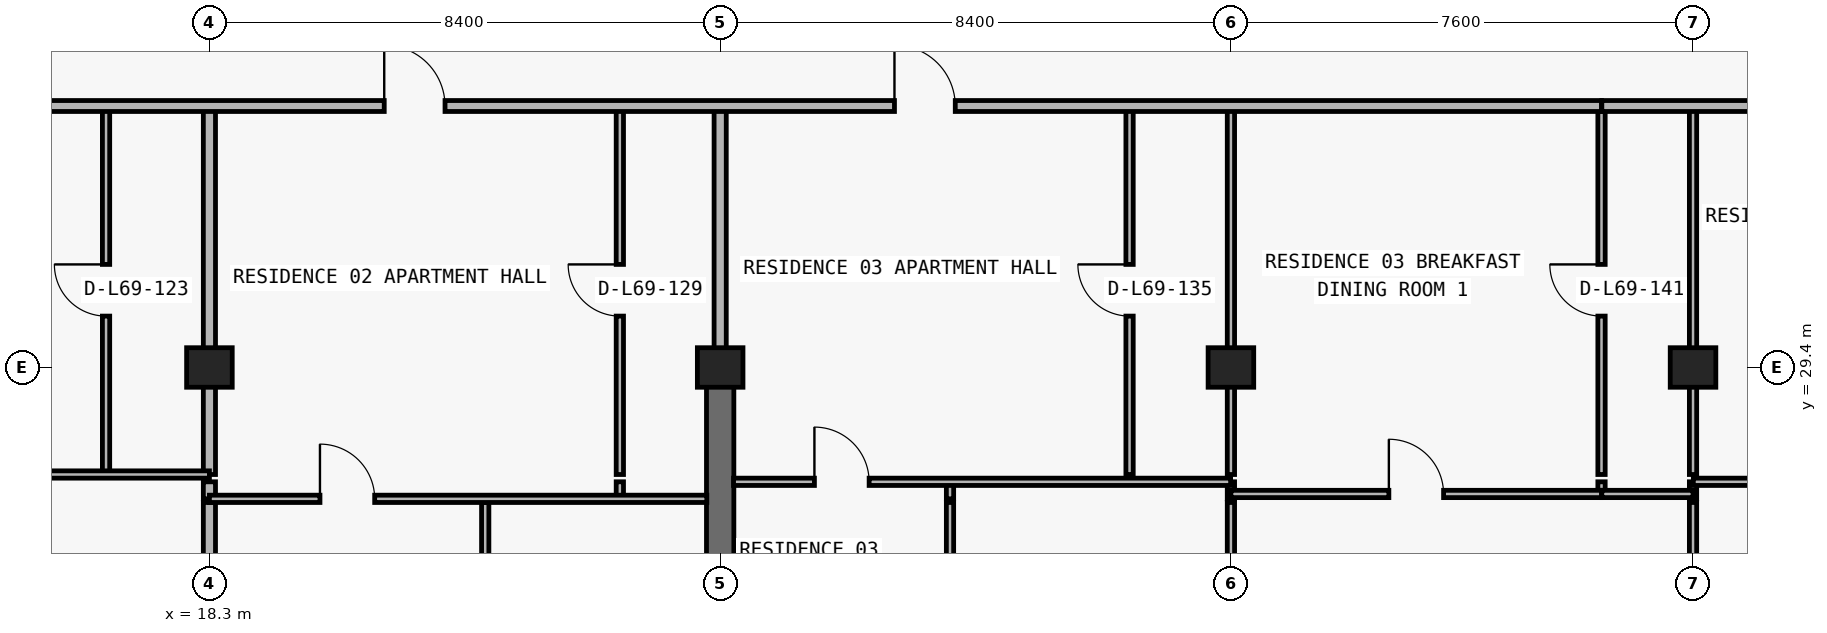
"""IFC4 building model, lengths in metres.
Left out: names, types, materials, properties, quantities, classifications, styles, units other than length and angle.
Written with IfcOpenShell. Run it as: python <this file> out.ifc"""

import sys

from ifc_helpers import new_model, si_unit, direction, frame, frame_2d, origin, origin_2d, place, context, subcontext, project, spatial, rectangle, extrude, element, fill, save


model = new_model("IFC4")
c1 = context("Model", 3, precision=1e-05, world=origin(), true_north=direction((0.0, 1.0)))
c2 = subcontext(c1, "Body", "Model", "MODEL_VIEW")
j1 = project(units=[si_unit("LENGTHUNIT", "METRE"), si_unit("PLANEANGLEUNIT", "RADIAN")], contexts=[c1])
p1 = place(None, origin())
s1 = spatial("IfcSite", under=j1, at=p1, CompositionType="ELEMENT")
p2 = place(p1, origin())
s2 = spatial("IfcBuilding", under=s1, at=p2, CompositionType="ELEMENT")
p3 = place(p2, frame((0.0, 0.0, 246.3)))
s3 = spatial("IfcBuildingStorey", under=s2, at=p3, CompositionType="ELEMENT", Elevation=246.3)
for number, where, z_axis, x_axis in (
    (1, (18.3, 29.4, 0.0), (0.0, 0.0, 1.0), (1.0, 0.0, 0.0)),
    (2, (26.7, 29.4, 0.0), (0.0, 0.0, 1.0), (1.0, 0.0, 0.0)),
    (3, (35.1, 29.4, 0.0), (0.0, 0.0, 1.0), (1.0, 0.0, 0.0)),
    (4, (42.7, 29.4, 0.0), (0.0, 0.0, 1.0), (1.0, 0.0, 0.0)),
):
    element("IfcColumn", number, at=place(p3, frame(where, z_axis=z_axis, x_axis=x_axis)), inside=s3, PredefinedType="COLUMN", context=c2, shape_type="SweptSolid", body=[
        extrude(rectangle(XDim=0.75, YDim=0.65, at=origin_2d()), origin(), (0.0, 0.0, 1.0), 3.05),
    ])
p4 = place(p3, frame((26.7, 20.8, 0.0), z_axis=(0.0, 0.0, 1.0), x_axis=(0.0, 1.0, 0.0)))
e5 = element("IfcWall", 5, at=p4, inside=s3, PredefinedType="SHEAR", context=c2, shape_type="SweptSolid", body=[
    extrude(rectangle(XDim=8.6, YDim=0.45, at=frame_2d((4.3, 0.0))), origin(), (0.0, 0.0, 1.0), 3.05),
])
p5 = place(p3, frame((16.6, 27.64, 0.0), z_axis=(0.0, 0.0, 1.0), x_axis=(0.0, 1.0, 0.0)))
e6 = element("IfcWall", 6, at=p5, inside=s3, PredefinedType="PARTITIONING", context=c2, shape_type="SweptSolid", body=[
    extrude(rectangle(XDim=6.06, YDim=0.12, at=frame_2d((3.03, 0.0))), origin(), (0.0, 0.0, 1.0), 3.05),
])
p6 = place(p5, frame((2.605, 0.0, 0.0)))
e7 = element("IfcOpeningElement", 7, at=p6, cuts=e6, PredefinedType="OPENING", context=c2, shape_type="SweptSolid", body=[
    extrude(rectangle(XDim=0.85, YDim=2.1, at=frame_2d((0.425, 1.05))), frame((0.0, 0.07, 0.0), z_axis=(0.0, -1.0, 0.0), x_axis=(1.0, 0.0, 0.0)), (0.0, 0.0, 1.0), 0.14),
])
p7 = place(p3, frame((18.3, 22.49, 0.0), z_axis=(0.0, 0.0, 1.0), x_axis=(0.0, 1.0, 0.0)))
e8 = element("IfcWall", 8, at=p7, inside=s3, PredefinedType="PARTITIONING", context=c2, shape_type="SweptSolid", body=[
    extrude(rectangle(XDim=4.69, YDim=0.2, at=frame_2d((2.345, 0.0))), origin(), (0.0, 0.0, 1.0), 2.263),
])
p8 = place(p3, frame((18.3, 27.24, 0.0), z_axis=(0.0, 0.0, 1.0), x_axis=(0.0, 1.0, 0.0)))
e9 = element("IfcWall", 9, at=p8, inside=s3, PredefinedType="PARTITIONING", context=c2, shape_type="SweptSolid", body=[
    extrude(rectangle(XDim=0.28, YDim=0.2, at=frame_2d((0.14, 0.0))), origin(), (0.0, 0.0, 1.0), 2.263),
])
p9 = place(p3, frame((18.3, 27.64, 0.0), z_axis=(0.0, 0.0, 1.0), x_axis=(0.0, 1.0, 0.0)))
e10 = element("IfcWall", 10, at=p9, inside=s3, PredefinedType="PARTITIONING", context=c2, shape_type="SweptSolid", body=[
    extrude(rectangle(XDim=6.06, YDim=0.2, at=frame_2d((3.03, 0.0))), origin(), (0.0, 0.0, 1.0), 2.263),
])
p10 = place(p3, frame((22.836, 22.49, 0.0), z_axis=(0.0, 0.0, 1.0), x_axis=(0.0, 1.0, 0.0)))
e11 = element("IfcWall", 11, at=p10, inside=s3, PredefinedType="PARTITIONING", context=c2, shape_type="SweptSolid", body=[
    extrude(rectangle(XDim=4.69, YDim=0.12, at=frame_2d((2.345, 0.0))), origin(), (0.0, 0.0, 1.0), 3.05),
])
p11 = place(p10, frame((1.895, 0.0, 0.0)))
e12 = element("IfcOpeningElement", 12, at=p11, cuts=e11, PredefinedType="OPENING", context=c2, shape_type="SweptSolid", body=[
    extrude(rectangle(XDim=0.9, YDim=2.15, at=frame_2d((0.45, 1.075))), frame((0.0, 0.07, 0.0), z_axis=(0.0, -1.0, 0.0), x_axis=(1.0, 0.0, 0.0)), (0.0, 0.0, 1.0), 0.14),
])
p12 = place(p3, frame((25.05, 27.24, 0.0), z_axis=(0.0, 0.0, 1.0), x_axis=(0.0, 1.0, 0.0)))
e13 = element("IfcWall", 13, at=p12, inside=s3, PredefinedType="PARTITIONING", context=c2, shape_type="SweptSolid", body=[
    extrude(rectangle(XDim=0.28, YDim=0.12, at=frame_2d((0.14, 0.0))), origin(), (0.0, 0.0, 1.0), 3.05),
])
p13 = place(p3, frame((25.05, 27.64, 0.0), z_axis=(0.0, 0.0, 1.0), x_axis=(0.0, 1.0, 0.0)))
e14 = element("IfcWall", 14, at=p13, inside=s3, PredefinedType="PARTITIONING", context=c2, shape_type="SweptSolid", body=[
    extrude(rectangle(XDim=6.06, YDim=0.12, at=frame_2d((3.03, 0.0))), origin(), (0.0, 0.0, 1.0), 3.05),
])
p14 = place(p13, frame((2.605, 0.0, 0.0)))
e15 = element("IfcOpeningElement", 15, at=p14, cuts=e14, PredefinedType="OPENING", context=c2, shape_type="SweptSolid", body=[
    extrude(rectangle(XDim=0.85, YDim=2.1, at=frame_2d((0.425, 1.05))), frame((0.0, 0.07, 0.0), z_axis=(0.0, -1.0, 0.0), x_axis=(1.0, 0.0, 0.0)), (0.0, 0.0, 1.0), 0.14),
])
p15 = place(p3, frame((26.7, 29.405, 0.0), z_axis=(0.0, 0.0, 1.0), x_axis=(0.0, 1.0, 0.0)))
e16 = element("IfcWall", 16, at=p15, inside=s3, PredefinedType="PARTITIONING", context=c2, shape_type="SweptSolid", body=[
    extrude(rectangle(XDim=4.295, YDim=0.2, at=frame_2d((2.147, 0.0))), origin(), (0.0, 0.0, 1.0), 2.335),
])
p16 = place(p3, frame((30.48, 22.72, 0.0), z_axis=(0.0, 0.0, 1.0), x_axis=(0.0, 1.0, 0.0)))
e17 = element("IfcWall", 17, at=p16, inside=s3, PredefinedType="PARTITIONING", context=c2, shape_type="SweptSolid", body=[
    extrude(rectangle(XDim=4.46, YDim=0.12, at=frame_2d((2.23, 0.0))), origin(), (0.0, 0.0, 1.0), 3.05),
])
p17 = place(p16, frame((1.78, 0.0, 0.0)))
e18 = element("IfcOpeningElement", 18, at=p17, cuts=e17, PredefinedType="OPENING", context=c2, shape_type="SweptSolid", body=[
    extrude(rectangle(XDim=0.9, YDim=2.15, at=frame_2d((0.45, 1.075))), frame((0.0, 0.07, 0.0), z_axis=(0.0, -1.0, 0.0), x_axis=(1.0, 0.0, 0.0)), (0.0, 0.0, 1.0), 0.14),
])
p18 = place(p3, frame((30.48, 27.24, 0.0), z_axis=(0.0, 0.0, 1.0), x_axis=(0.0, 1.0, 0.0)))
e19 = element("IfcWall", 19, at=p18, inside=s3, PredefinedType="PARTITIONING", context=c2, shape_type="SweptSolid", body=[
    extrude(rectangle(XDim=0.28, YDim=0.12, at=frame_2d((0.14, 0.0))), origin(), (0.0, 0.0, 1.0), 3.05),
])
p19 = place(p3, frame((33.433, 27.64, 0.0), z_axis=(0.0, 0.0, 1.0), x_axis=(0.0, 1.0, 0.0)))
e20 = element("IfcWall", 20, at=p19, inside=s3, PredefinedType="PARTITIONING", context=c2, shape_type="SweptSolid", body=[
    extrude(rectangle(XDim=6.06, YDim=0.12, at=frame_2d((3.03, 0.0))), origin(), (0.0, 0.0, 1.0), 3.05),
])
p20 = place(p19, frame((2.605, 0.0, 0.0)))
e21 = element("IfcOpeningElement", 21, at=p20, cuts=e20, PredefinedType="OPENING", context=c2, shape_type="SweptSolid", body=[
    extrude(rectangle(XDim=0.85, YDim=2.1, at=frame_2d((0.425, 1.05))), frame((0.0, 0.07, 0.0), z_axis=(0.0, -1.0, 0.0), x_axis=(1.0, 0.0, 0.0)), (0.0, 0.0, 1.0), 0.14),
])
p21 = place(p3, frame((35.1, 22.49, 0.0), z_axis=(0.0, 0.0, 1.0), x_axis=(0.0, 1.0, 0.0)))
e22 = element("IfcWall", 22, at=p21, inside=s3, PredefinedType="PARTITIONING", context=c2, shape_type="SweptSolid", body=[
    extrude(rectangle(XDim=4.69, YDim=0.12, at=frame_2d((2.345, 0.0))), origin(), (0.0, 0.0, 1.0), 2.263),
])
p22 = place(p21, frame((2.11, 0.0, 0.0)))
e23 = element("IfcOpeningElement", 23, at=p22, cuts=e22, PredefinedType="OPENING", context=c2, shape_type="SweptSolid", body=[
    extrude(rectangle(XDim=0.9, YDim=2.15, at=frame_2d((0.45, 1.075))), frame((0.0, 0.07, 0.0), z_axis=(0.0, -1.0, 0.0), x_axis=(1.0, 0.0, 0.0)), (0.0, 0.0, 1.0), 0.14),
])
p23 = place(p3, frame((35.1, 27.24, 0.0), z_axis=(0.0, 0.0, 1.0), x_axis=(0.0, 1.0, 0.0)))
e24 = element("IfcWall", 24, at=p23, inside=s3, PredefinedType="PARTITIONING", context=c2, shape_type="SweptSolid", body=[
    extrude(rectangle(XDim=0.28, YDim=0.12, at=frame_2d((0.14, 0.0))), origin(), (0.0, 0.0, 1.0), 2.263),
])
p24 = place(p3, frame((35.1, 27.64, 0.0), z_axis=(0.0, 0.0, 1.0), x_axis=(0.0, 1.0, 0.0)))
e25 = element("IfcWall", 25, at=p24, inside=s3, PredefinedType="PARTITIONING", context=c2, shape_type="SweptSolid", body=[
    extrude(rectangle(XDim=6.06, YDim=0.12, at=frame_2d((3.03, 0.0))), origin(), (0.0, 0.0, 1.0), 2.263),
])
p25 = place(p3, frame((41.195, 27.32, 0.0), z_axis=(0.0, 0.0, 1.0), x_axis=(0.0, 1.0, 0.0)))
e26 = element("IfcWall", 26, at=p25, inside=s3, PredefinedType="PARTITIONING", context=c2, shape_type="SweptSolid", body=[
    extrude(rectangle(XDim=0.2, YDim=0.12, at=frame_2d((0.1, 0.0))), origin(), (0.0, 0.0, 1.0), 3.05),
])
p26 = place(p3, frame((41.195, 27.64, 0.0), z_axis=(0.0, 0.0, 1.0), x_axis=(0.0, 1.0, 0.0)))
e27 = element("IfcWall", 27, at=p26, inside=s3, PredefinedType="PARTITIONING", context=c2, shape_type="SweptSolid", body=[
    extrude(rectangle(XDim=6.06, YDim=0.12, at=frame_2d((3.03, 0.0))), origin(), (0.0, 0.0, 1.0), 3.05),
])
p27 = place(p26, frame((2.605, 0.0, 0.0)))
e28 = element("IfcOpeningElement", 28, at=p27, cuts=e27, PredefinedType="OPENING", context=c2, shape_type="SweptSolid", body=[
    extrude(rectangle(XDim=0.85, YDim=2.1, at=frame_2d((0.425, 1.05))), frame((0.0, 0.07, 0.0), z_axis=(0.0, -1.0, 0.0), x_axis=(1.0, 0.0, 0.0)), (0.0, 0.0, 1.0), 0.14),
])
p28 = place(p3, frame((42.7, 22.49, 0.0), z_axis=(0.0, 0.0, 1.0), x_axis=(0.0, 1.0, 0.0)))
e29 = element("IfcWall", 29, at=p28, inside=s3, PredefinedType="PARTITIONING", context=c2, shape_type="SweptSolid", body=[
    extrude(rectangle(XDim=4.69, YDim=0.12, at=frame_2d((2.345, 0.0))), origin(), (0.0, 0.0, 1.0), 2.263),
])
p29 = place(p28, frame((2.11, 0.0, 0.0)))
e30 = element("IfcOpeningElement", 30, at=p29, cuts=e29, PredefinedType="OPENING", context=c2, shape_type="SweptSolid", body=[
    extrude(rectangle(XDim=0.9, YDim=2.15, at=frame_2d((0.45, 1.075))), frame((0.0, 0.07, 0.0), z_axis=(0.0, -1.0, 0.0), x_axis=(1.0, 0.0, 0.0)), (0.0, 0.0, 1.0), 0.14),
])
p30 = place(p3, frame((42.7, 27.24, 0.0), z_axis=(0.0, 0.0, 1.0), x_axis=(0.0, 1.0, 0.0)))
e31 = element("IfcWall", 31, at=p30, inside=s3, PredefinedType="PARTITIONING", context=c2, shape_type="SweptSolid", body=[
    extrude(rectangle(XDim=0.28, YDim=0.12, at=frame_2d((0.14, 0.0))), origin(), (0.0, 0.0, 1.0), 2.263),
])
p31 = place(p3, frame((42.7, 27.64, 0.0), z_axis=(0.0, 0.0, 1.0), x_axis=(0.0, 1.0, 0.0)))
e32 = element("IfcWall", 32, at=p31, inside=s3, PredefinedType="PARTITIONING", context=c2, shape_type="SweptSolid", body=[
    extrude(rectangle(XDim=6.06, YDim=0.12, at=frame_2d((3.03, 0.0))), origin(), (0.0, 0.0, 1.0), 2.263),
])
p32 = place(p3, frame((18.3, 27.24, 0.0), z_axis=(0.0, 0.0, 1.0), x_axis=(1.0, 0.0, 0.0)))
e33 = element("IfcWall", 33, at=p32, inside=s3, PredefinedType="PARTITIONING", context=c2, shape_type="SweptSolid", body=[
    extrude(rectangle(XDim=8.18, YDim=0.12, at=frame_2d((4.09, 0.0))), origin(), (0.0, 0.0, 1.0), 3.05),
])
p33 = place(p32, frame((1.818, 0.0, 0.0)))
e34 = element("IfcOpeningElement", 34, at=p33, cuts=e33, PredefinedType="OPENING", context=c2, shape_type="SweptSolid", body=[
    extrude(rectangle(XDim=0.9, YDim=2.15, at=frame_2d((0.45, 1.075))), frame((0.0, 0.07, 0.0), z_axis=(0.0, -1.0, 0.0), x_axis=(1.0, 0.0, 0.0)), (0.0, 0.0, 1.0), 0.14),
])
p34 = place(p3, frame((35.1, 27.32, 0.0), z_axis=(0.0, 0.0, 1.0), x_axis=(1.0, 0.0, 0.0)))
e35 = element("IfcWall", 35, at=p34, inside=s3, PredefinedType="PARTITIONING", context=c2, shape_type="SweptSolid", body=[
    extrude(rectangle(XDim=6.095, YDim=0.12, at=frame_2d((3.047, 0.0))), origin(), (0.0, 0.0, 1.0), 3.05),
])
p35 = place(p34, frame((2.597, 0.0, 0.0)))
e36 = element("IfcOpeningElement", 36, at=p35, cuts=e35, PredefinedType="OPENING", context=c2, shape_type="SweptSolid", body=[
    extrude(rectangle(XDim=0.9, YDim=2.15, at=frame_2d((0.45, 1.075))), frame((0.0, 0.07, 0.0), z_axis=(0.0, -1.0, 0.0), x_axis=(1.0, 0.0, 0.0)), (0.0, 0.0, 1.0), 0.14),
])
p36 = place(p3, frame((41.2, 27.32, 0.0), z_axis=(0.0, 0.0, 1.0), x_axis=(1.0, 0.0, 0.0)))
e37 = element("IfcWall", 37, at=p36, inside=s3, PredefinedType="PARTITIONING", context=c2, shape_type="SweptSolid", body=[
    extrude(rectangle(XDim=1.5, YDim=0.12, at=frame_2d((0.75, 0.0))), origin(), (0.0, 0.0, 1.0), 3.05),
])
p37 = place(p3, frame((26.92, 27.52, 0.0), z_axis=(0.0, 0.0, 1.0), x_axis=(1.0, 0.0, 0.0)))
e38 = element("IfcWall", 38, at=p37, inside=s3, PredefinedType="PARTITIONING", context=c2, shape_type="SweptSolid", body=[
    extrude(rectangle(XDim=8.175, YDim=0.12, at=frame_2d((4.087, 0.0))), origin(), (0.0, 0.0, 1.0), 3.05),
])
p38 = place(p37, frame((1.33, 0.0, 0.0)))
e39 = element("IfcOpeningElement", 39, at=p38, cuts=e38, PredefinedType="OPENING", context=c2, shape_type="SweptSolid", body=[
    extrude(rectangle(XDim=0.9, YDim=2.15, at=frame_2d((0.45, 1.075))), frame((0.0, 0.07, 0.0), z_axis=(0.0, -1.0, 0.0), x_axis=(1.0, 0.0, 0.0)), (0.0, 0.0, 1.0), 0.14),
])
p39 = place(p3, frame((42.705, 27.52, 0.0), z_axis=(0.0, 0.0, 1.0), x_axis=(1.0, 0.0, 0.0)))
e40 = element("IfcWall", 40, at=p39, inside=s3, PredefinedType="PARTITIONING", context=c2, shape_type="SweptSolid", body=[
    extrude(rectangle(XDim=8.175, YDim=0.12, at=frame_2d((4.087, 0.0))), origin(), (0.0, 0.0, 1.0), 3.05),
])
p40 = place(p39, frame((2.93, 0.0, 0.0)))
e41 = element("IfcOpeningElement", 41, at=p40, cuts=e40, PredefinedType="OPENING", context=c2, shape_type="SweptSolid", body=[
    extrude(rectangle(XDim=0.9, YDim=2.15, at=frame_2d((0.45, 1.075))), frame((0.0, 0.07, 0.0), z_axis=(0.0, -1.0, 0.0), x_axis=(1.0, 0.0, 0.0)), (0.0, 0.0, 1.0), 0.14),
])
p41 = place(p3, frame((15.203, 27.64, 0.0), z_axis=(0.0, 0.0, 1.0), x_axis=(1.0, 0.0, 0.0)))
e42 = element("IfcWall", 42, at=p41, inside=s3, PredefinedType="PARTITIONING", context=c2, shape_type="SweptSolid", body=[
    extrude(rectangle(XDim=3.097, YDim=0.12, at=frame_2d((1.549, 0.0))), origin(), (0.0, 0.0, 1.0), 3.05),
])
p42 = place(p3, frame((15.203, 33.7, 0.0), z_axis=(0.0, 0.0, 1.0), x_axis=(1.0, 0.0, 0.0)))
e43 = element("IfcWall", 43, at=p42, inside=s3, PredefinedType="PARTITIONING", context=c2, shape_type="SweptSolid", body=[
    extrude(rectangle(XDim=25.992, YDim=0.18, at=frame_2d((12.996, 0.0))), origin(), (0.0, 0.0, 1.0), 3.05),
])
p43 = place(p42, frame((5.972, 0.0, 0.0)))
e44 = element("IfcOpeningElement", 44, at=p43, cuts=e43, PredefinedType="OPENING", context=c2, shape_type="SweptSolid", body=[
    extrude(rectangle(XDim=1.0, YDim=2.2, at=frame_2d((0.5, 1.1))), frame((0.0, 0.1, 0.0), z_axis=(0.0, -1.0, 0.0), x_axis=(1.0, 0.0, 0.0)), (0.0, 0.0, 1.0), 0.2),
])
p44 = place(p42, frame((14.364, 0.0, 0.0)))
e45 = element("IfcOpeningElement", 45, at=p44, cuts=e43, PredefinedType="OPENING", context=c2, shape_type="SweptSolid", body=[
    extrude(rectangle(XDim=1.0, YDim=2.2, at=frame_2d((0.5, 1.1))), frame((0.0, 0.1, 0.0), z_axis=(0.0, -1.0, 0.0), x_axis=(1.0, 0.0, 0.0)), (0.0, 0.0, 1.0), 0.2),
])
p45 = place(p3, frame((41.2, 33.7, 0.0), z_axis=(0.0, 0.0, 1.0), x_axis=(1.0, 0.0, 0.0)))
e46 = element("IfcWall", 46, at=p45, inside=s3, PredefinedType="PARTITIONING", context=c2, shape_type="SweptSolid", body=[
    extrude(rectangle(XDim=24.5, YDim=0.18, at=frame_2d((12.25, 0.0))), origin(), (0.0, 0.0, 1.0), 3.05),
])
p46 = place(p45, frame((12.775, 0.0, 0.0)))
e47 = element("IfcOpeningElement", 47, at=p46, cuts=e46, PredefinedType="OPENING", context=c2, shape_type="SweptSolid", body=[
    extrude(rectangle(XDim=1.0, YDim=2.2, at=frame_2d((0.5, 1.1))), frame((0.0, 0.1, 0.0), z_axis=(0.0, -1.0, 0.0), x_axis=(1.0, 0.0, 0.0)), (0.0, 0.0, 1.0), 0.2),
])
p47 = place(p45, frame((20.059, 0.0, 0.0)))
e48 = element("IfcOpeningElement", 48, at=p47, cuts=e46, PredefinedType="OPENING", context=c2, shape_type="SweptSolid", body=[
    extrude(rectangle(XDim=1.0, YDim=2.2, at=frame_2d((0.5, 1.1))), frame((0.0, 0.1, 0.0), z_axis=(0.0, -1.0, 0.0), x_axis=(1.0, 0.0, 0.0)), (0.0, 0.0, 1.0), 0.2),
])
p48 = place(p6, origin())
e49 = element("IfcDoor", 49, at=p48, inside=s3, OperationType="SINGLE_SWING_RIGHT", PredefinedType="DOOR", context=c2, shape_type="SweptSolid", body=[
    extrude(rectangle(XDim=0.85, YDim=2.1, at=frame_2d((0.425, 1.05))), frame((0.0, 0.025, 0.0), z_axis=(0.0, -1.0, 0.0), x_axis=(1.0, 0.0, 0.0)), (0.0, 0.0, 1.0), 0.05),
])
fill(e7, e49)
p49 = place(p43, origin())
e50 = element("IfcDoor", 50, at=p49, inside=s3, OperationType="SINGLE_SWING_LEFT", PredefinedType="DOOR", context=c2, shape_type="SweptSolid", body=[
    extrude(rectangle(XDim=1.0, YDim=2.2, at=frame_2d((0.5, 1.1))), frame((0.0, 0.025, 0.0), z_axis=(0.0, -1.0, 0.0), x_axis=(1.0, 0.0, 0.0)), (0.0, 0.0, 1.0), 0.05),
])
fill(e44, e50)
p50 = place(p14, origin())
e51 = element("IfcDoor", 51, at=p50, inside=s3, OperationType="SINGLE_SWING_RIGHT", PredefinedType="DOOR", context=c2, shape_type="SweptSolid", body=[
    extrude(rectangle(XDim=0.85, YDim=2.1, at=frame_2d((0.425, 1.05))), frame((0.0, 0.025, 0.0), z_axis=(0.0, -1.0, 0.0), x_axis=(1.0, 0.0, 0.0)), (0.0, 0.0, 1.0), 0.05),
])
fill(e15, e51)
p51 = place(p33, origin())
e52 = element("IfcDoor", 52, at=p51, inside=s3, OperationType="SINGLE_SWING_LEFT", PredefinedType="DOOR", context=c2, shape_type="SweptSolid", body=[
    extrude(rectangle(XDim=0.9, YDim=2.15, at=frame_2d((0.45, 1.075))), frame((0.0, 0.025, 0.0), z_axis=(0.0, -1.0, 0.0), x_axis=(1.0, 0.0, 0.0)), (0.0, 0.0, 1.0), 0.05),
])
fill(e34, e52)
p52 = place(p44, origin())
e53 = element("IfcDoor", 53, at=p52, inside=s3, OperationType="SINGLE_SWING_LEFT", PredefinedType="DOOR", context=c2, shape_type="SweptSolid", body=[
    extrude(rectangle(XDim=1.0, YDim=2.2, at=frame_2d((0.5, 1.1))), frame((0.0, 0.025, 0.0), z_axis=(0.0, -1.0, 0.0), x_axis=(1.0, 0.0, 0.0)), (0.0, 0.0, 1.0), 0.05),
])
fill(e45, e53)
p53 = place(p20, origin())
e54 = element("IfcDoor", 54, at=p53, inside=s3, OperationType="SINGLE_SWING_RIGHT", PredefinedType="DOOR", context=c2, shape_type="SweptSolid", body=[
    extrude(rectangle(XDim=0.85, YDim=2.1, at=frame_2d((0.425, 1.05))), frame((0.0, 0.025, 0.0), z_axis=(0.0, -1.0, 0.0), x_axis=(1.0, 0.0, 0.0)), (0.0, 0.0, 1.0), 0.05),
])
fill(e21, e54)
p54 = place(p38, origin())
e55 = element("IfcDoor", 55, at=p54, inside=s3, OperationType="SINGLE_SWING_LEFT", PredefinedType="DOOR", context=c2, shape_type="SweptSolid", body=[
    extrude(rectangle(XDim=0.9, YDim=2.15, at=frame_2d((0.45, 1.075))), frame((0.0, 0.025, 0.0), z_axis=(0.0, -1.0, 0.0), x_axis=(1.0, 0.0, 0.0)), (0.0, 0.0, 1.0), 0.05),
])
fill(e39, e55)
p55 = place(p35, origin())
e56 = element("IfcDoor", 56, at=p55, inside=s3, OperationType="SINGLE_SWING_LEFT", PredefinedType="DOOR", context=c2, shape_type="SweptSolid", body=[
    extrude(rectangle(XDim=0.9, YDim=2.15, at=frame_2d((0.45, 1.075))), frame((0.0, 0.025, 0.0), z_axis=(0.0, -1.0, 0.0), x_axis=(1.0, 0.0, 0.0)), (0.0, 0.0, 1.0), 0.05),
])
fill(e36, e56)
p56 = place(p27, origin())
e57 = element("IfcDoor", 57, at=p56, inside=s3, OperationType="SINGLE_SWING_RIGHT", PredefinedType="DOOR", context=c2, shape_type="SweptSolid", body=[
    extrude(rectangle(XDim=0.85, YDim=2.1, at=frame_2d((0.425, 1.05))), frame((0.0, 0.025, 0.0), z_axis=(0.0, -1.0, 0.0), x_axis=(1.0, 0.0, 0.0)), (0.0, 0.0, 1.0), 0.05),
])
fill(e28, e57)
save(model, sys.argv[1])
